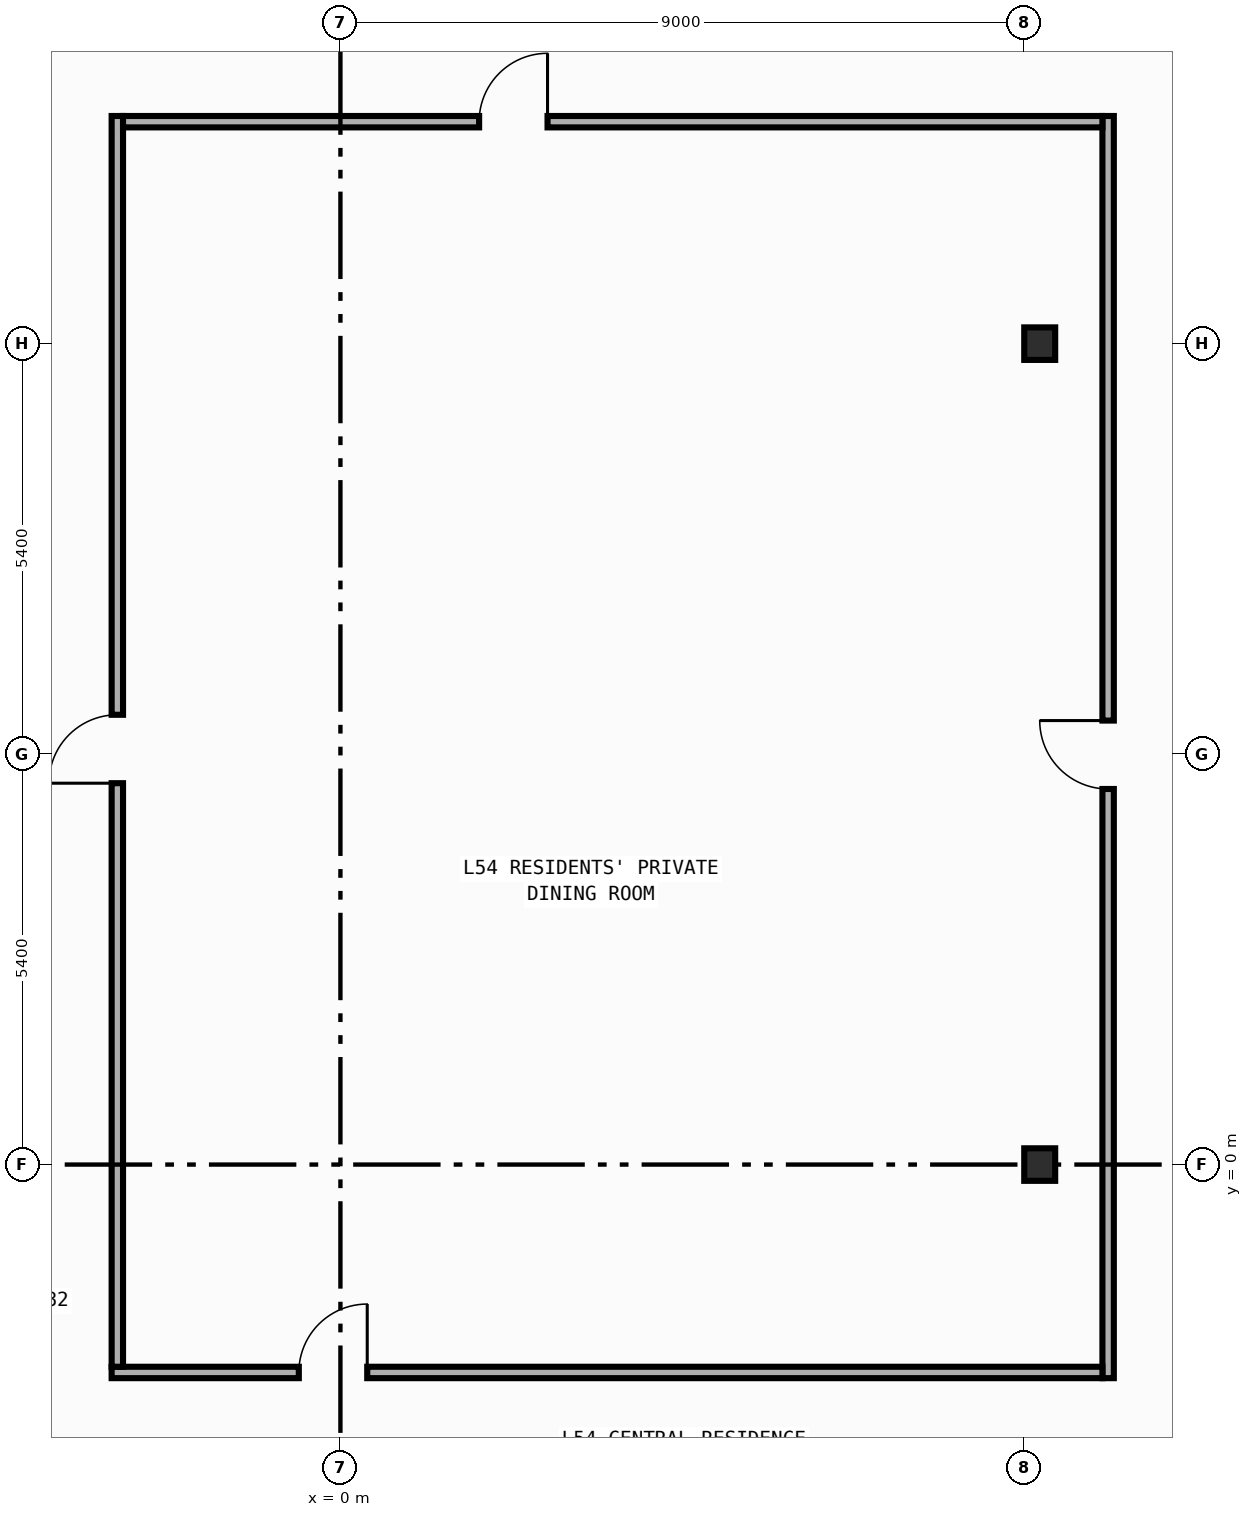
"""IFC4 building model, lengths in metres.
Left out: names, types, materials, properties, quantities, classifications, styles, units other than length and angle.
Written with IfcOpenShell. Run it as: python <this file> out.ifc"""

import sys

from ifc_helpers import new_model, si_unit, direction, frame, frame_2d, origin, origin_2d, place, context, subcontext, project, spatial, rectangle, i_section, extrude, element, fill, save


model = new_model("IFC4")
c1 = context("Model", 3, precision=1e-05, world=origin(), true_north=direction((0.0, 1.0)))
c2 = subcontext(c1, "Body", "Model", "MODEL_VIEW")
j1 = project(units=[si_unit("LENGTHUNIT", "METRE"), si_unit("PLANEANGLEUNIT", "RADIAN")], contexts=[c1])
p1 = place(None, origin())
s1 = spatial("IfcSite", under=j1, at=p1, CompositionType="ELEMENT")
p2 = place(p1, origin())
s2 = spatial("IfcBuilding", under=s1, at=p2, CompositionType="ELEMENT")
p3 = place(p2, frame((0.0, 0.0, 233.2)))
s3 = spatial("IfcBuildingStorey", under=s2, at=p3, CompositionType="ELEMENT", Elevation=233.2)
for number, where, z_axis, x_axis in (
    (1, (9.2, 0.0, 0.0), (0.0, 0.0, 1.0), (1.0, 0.0, 0.0)),
    (2, (9.2, 10.8, 0.0), (0.0, 0.0, 1.0), (1.0, 0.0, 0.0)),
):
    element("IfcColumn", number, at=place(p3, frame(where, z_axis=z_axis, x_axis=x_axis)), inside=s3, PredefinedType="COLUMN", context=c2, shape_type="SweptSolid", body=[
        extrude(i_section(OverallWidth=0.407, OverallDepth=0.428, WebThickness=0.02, FlangeThickness=0.035, FilletRadius=0.022, at=origin_2d()), origin(), (0.0, 0.0, 1.0), 3.6),
    ])
p4 = place(p3, frame((10.1, -2.81, 0.0), z_axis=(0.0, 0.0, 1.0), x_axis=(0.0, 1.0, 0.0)))
e3 = element("IfcWall", 3, at=p4, inside=s3, PredefinedType="PARTITIONING", context=c2, shape_type="SweptSolid", body=[
    extrude(rectangle(XDim=16.605, YDim=0.15, at=frame_2d((8.302, 0.0))), origin(), (0.0, 0.0, 1.0), 3.34),
])
p5 = place(p4, frame((7.751, 0.0, 0.0)))
e4 = element("IfcOpeningElement", 4, at=p5, cuts=e3, PredefinedType="OPENING", context=c2, shape_type="SweptSolid", body=[
    extrude(rectangle(XDim=0.9, YDim=2.15, at=frame_2d((0.45, 1.075))), frame((0.0, 0.085, 0.0), z_axis=(0.0, -1.0, 0.0), x_axis=(1.0, 0.0, 0.0)), (0.0, 0.0, 1.0), 0.17),
])
p6 = place(p3, frame((-3.01, -2.735, 0.0), z_axis=(0.0, 0.0, 1.0), x_axis=(1.0, 0.0, 0.0)))
e5 = element("IfcWall", 5, at=p6, inside=s3, PredefinedType="PARTITIONING", context=c2, shape_type="SweptSolid", body=[
    extrude(rectangle(XDim=13.035, YDim=0.15, at=frame_2d((6.518, 0.0))), origin(), (0.0, 0.0, 1.0), 3.34),
])
p7 = place(p6, frame((2.463, 0.0, 0.0)))
e6 = element("IfcOpeningElement", 6, at=p7, cuts=e5, PredefinedType="OPENING", context=c2, shape_type="SweptSolid", body=[
    extrude(rectangle(XDim=0.9, YDim=2.15, at=frame_2d((0.45, 1.075))), frame((0.0, 0.085, 0.0), z_axis=(0.0, -1.0, 0.0), x_axis=(1.0, 0.0, 0.0)), (0.0, 0.0, 1.0), 0.17),
])
p8 = place(p3, frame((-2.935, -2.66, 0.0), z_axis=(0.0, 0.0, 1.0), x_axis=(0.0, 1.0, 0.0)))
e7 = element("IfcWall", 7, at=p8, inside=s3, PredefinedType="PARTITIONING", context=c2, shape_type="SweptSolid", body=[
    extrude(rectangle(XDim=16.455, YDim=0.15, at=frame_2d((8.228, 0.0))), origin(), (0.0, 0.0, 1.0), 3.34),
])
p9 = place(p8, frame((7.677, 0.0, 0.0)))
e8 = element("IfcOpeningElement", 8, at=p9, cuts=e7, PredefinedType="OPENING", context=c2, shape_type="SweptSolid", body=[
    extrude(rectangle(XDim=0.9, YDim=2.15, at=frame_2d((0.45, 1.075))), frame((0.0, 0.085, 0.0), z_axis=(0.0, -1.0, 0.0), x_axis=(1.0, 0.0, 0.0)), (0.0, 0.0, 1.0), 0.17),
])
p10 = place(p3, frame((-2.86, 13.72, 0.0), z_axis=(0.0, 0.0, 1.0), x_axis=(1.0, 0.0, 0.0)))
e9 = element("IfcWall", 9, at=p10, inside=s3, PredefinedType="PARTITIONING", context=c2, shape_type="SweptSolid", body=[
    extrude(rectangle(XDim=12.885, YDim=0.15, at=frame_2d((6.442, 0.0))), origin(), (0.0, 0.0, 1.0), 3.34),
])
p11 = place(p10, frame((4.685, 0.0, 0.0)))
e10 = element("IfcOpeningElement", 10, at=p11, cuts=e9, PredefinedType="OPENING", context=c2, shape_type="SweptSolid", body=[
    extrude(rectangle(XDim=0.9, YDim=2.15, at=frame_2d((0.45, 1.075))), frame((0.0, 0.085, 0.0), z_axis=(0.0, -1.0, 0.0), x_axis=(1.0, 0.0, 0.0)), (0.0, 0.0, 1.0), 0.17),
])
p12 = place(p5, origin())
e11 = element("IfcDoor", 11, at=p12, inside=s3, OperationType="SINGLE_SWING_RIGHT", PredefinedType="DOOR", context=c2, shape_type="SweptSolid", body=[
    extrude(rectangle(XDim=0.9, YDim=2.15, at=frame_2d((0.45, 1.075))), frame((0.0, 0.025, 0.0), z_axis=(0.0, -1.0, 0.0), x_axis=(1.0, 0.0, 0.0)), (0.0, 0.0, 1.0), 0.05),
])
fill(e4, e11)
p13 = place(p7, origin())
e12 = element("IfcDoor", 12, at=p13, inside=s3, OperationType="SINGLE_SWING_RIGHT", PredefinedType="DOOR", context=c2, shape_type="SweptSolid", body=[
    extrude(rectangle(XDim=0.9, YDim=2.15, at=frame_2d((0.45, 1.075))), frame((0.0, 0.025, 0.0), z_axis=(0.0, -1.0, 0.0), x_axis=(1.0, 0.0, 0.0)), (0.0, 0.0, 1.0), 0.05),
])
fill(e6, e12)
p14 = place(p9, origin())
e13 = element("IfcDoor", 13, at=p14, inside=s3, OperationType="SINGLE_SWING_LEFT", PredefinedType="DOOR", context=c2, shape_type="SweptSolid", body=[
    extrude(rectangle(XDim=0.9, YDim=2.15, at=frame_2d((0.45, 1.075))), frame((0.0, 0.025, 0.0), z_axis=(0.0, -1.0, 0.0), x_axis=(1.0, 0.0, 0.0)), (0.0, 0.0, 1.0), 0.05),
])
fill(e8, e13)
p15 = place(p11, origin())
e14 = element("IfcDoor", 14, at=p15, inside=s3, OperationType="SINGLE_SWING_RIGHT", PredefinedType="DOOR", context=c2, shape_type="SweptSolid", body=[
    extrude(rectangle(XDim=0.9, YDim=2.15, at=frame_2d((0.45, 1.075))), frame((0.0, 0.025, 0.0), z_axis=(0.0, -1.0, 0.0), x_axis=(1.0, 0.0, 0.0)), (0.0, 0.0, 1.0), 0.05),
])
fill(e10, e14)
save(model, sys.argv[1])
